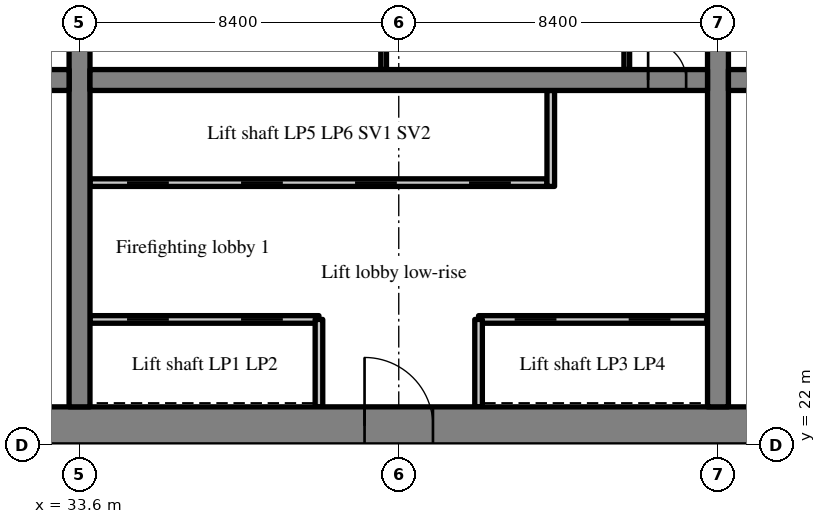
"""IFC4 building model, lengths in metres.
Left out: names, types, materials, properties, quantities, classifications, styles, units other than length and angle.
Written with IfcOpenShell. Run it as: python <this file> out.ifc"""

import sys

from ifc_helpers import new_model, si_unit, direction, frame, frame_2d, origin, place, context, subcontext, project, spatial, rectangle, extrude, source, transform, mapped, element, fill, save


model = new_model("IFC4")
c1 = context("Model", 3, precision=1e-05, world=origin(), true_north=direction((0.0, 1.0)))
c2 = subcontext(c1, "Body", "Model", "MODEL_VIEW")
j1 = project(units=[si_unit("LENGTHUNIT", "METRE"), si_unit("PLANEANGLEUNIT", "RADIAN")], contexts=[c1])
p1 = place(None, origin())
s1 = spatial("IfcSite", under=j1, at=p1, CompositionType="ELEMENT")
p2 = place(p1, origin())
s2 = spatial("IfcBuilding", under=s1, at=p2, CompositionType="ELEMENT")
p3 = place(p2, frame((0.0, 0.0, 73.4)))
s3 = spatial("IfcBuildingStorey", under=s2, at=p3, CompositionType="ELEMENT", Elevation=73.4)
m1 = source(origin(), c2, "Body", "SweptSolid", [
    extrude(rectangle(XDim=50.4, YDim=1.0, at=frame_2d((25.2, 0.0))), origin(), (0.0, 0.0, 1.0), 3.52),
])
p4 = place(p3, frame((25.2, 22.5, 0.0), z_axis=(0.0, 0.0, 1.0), x_axis=(1.0, 0.0, 0.0)))
e1 = element("IfcWall", 1, at=p4, inside=s3, PredefinedType="SHEAR", context=c2, shape_type="MappedRepresentation", body=[
    mapped(m1, transform((0.0, 0.0, 0.0), scale=1.0)),
])
m2 = source(origin(), c2, "Body", "SweptSolid", [
    extrude(rectangle(XDim=1.8, YDim=2.1, at=frame_2d((0.9, 1.05))), frame((0.0, 0.51, 0.0), z_axis=(0.0, -1.0, 0.0), x_axis=(1.0, 0.0, 0.0)), (0.0, 0.0, 1.0), 1.02),
])
p5 = place(p4, frame((15.9, 0.0, 0.0)))
e2 = element("IfcOpeningElement", 2, at=p5, cuts=e1, PredefinedType="OPENING", context=c2, shape_type="MappedRepresentation", body=[
    mapped(m2, transform((0.0, 0.0, 0.0), scale=1.0)),
])
m3 = source(origin(), c2, "Body", "SweptSolid", [
    extrude(rectangle(XDim=1.2, YDim=2.1, at=frame_2d((0.6, 1.05))), frame((0.0, 0.51, 0.0), z_axis=(0.0, -1.0, 0.0), x_axis=(1.0, 0.0, 0.0)), (0.0, 0.0, 1.0), 1.02),
])
p6 = place(p4, frame((26.987, 0.0, 0.0)))
e3 = element("IfcOpeningElement", 3, at=p6, cuts=e1, PredefinedType="OPENING", context=c2, shape_type="MappedRepresentation", body=[
    mapped(m3, transform((0.0, 0.0, 0.0), scale=1.0)),
])
m4 = source(origin(), c2, "Body", "SweptSolid", [
    extrude(rectangle(XDim=0.9, YDim=2.1, at=frame_2d((0.45, 1.05))), frame((0.0, 0.51, 0.0), z_axis=(0.0, -1.0, 0.0), x_axis=(1.0, 0.0, 0.0)), (0.0, 0.0, 1.0), 1.02),
])
p7 = place(p4, frame((32.25, 0.0, 0.0)))
e4 = element("IfcOpeningElement", 4, at=p7, cuts=e1, PredefinedType="OPENING", context=c2, shape_type="MappedRepresentation", body=[
    mapped(m4, transform((0.0, 0.0, 0.0), scale=1.0)),
])
p8 = place(p4, frame((38.262, 0.0, 0.0)))
e5 = element("IfcOpeningElement", 5, at=p8, cuts=e1, PredefinedType="OPENING", context=c2, shape_type="MappedRepresentation", body=[
    mapped(m4, transform((0.0, 0.0, 0.0), scale=1.0)),
])
p9 = place(p4, frame((6.438, 0.0, 0.0)))
e6 = element("IfcOpeningElement", 6, at=p9, cuts=e1, PredefinedType="OPENING", context=c2, shape_type="MappedRepresentation", body=[
    mapped(m3, transform((0.0, 0.0, 0.0), scale=1.0)),
])
p10 = place(p4, frame((47.725, 0.0, 0.0)))
e7 = element("IfcOpeningElement", 7, at=p10, cuts=e1, PredefinedType="OPENING", context=c2, shape_type="MappedRepresentation", body=[
    mapped(m3, transform((0.0, 0.0, 0.0), scale=1.0)),
])
m5 = source(origin(), c2, "Body", "SweptSolid", [
    extrude(rectangle(XDim=18.0, YDim=0.55, at=frame_2d((9.0, 0.0))), origin(), (0.0, 0.0, 1.0), 3.52),
])
p11 = place(p3, frame((33.6, 23.0, 0.0), z_axis=(0.0, 0.0, 1.0), x_axis=(0.0, 1.0, 0.0)))
e8 = element("IfcWall", 8, at=p11, inside=s3, PredefinedType="SHEAR", context=c2, shape_type="MappedRepresentation", body=[
    mapped(m5, transform((0.0, 0.0, 0.0), scale=1.0)),
])
m6 = source(origin(), c2, "Body", "SweptSolid", [
    extrude(rectangle(XDim=1.1, YDim=2.1, at=frame_2d((0.55, 1.05))), frame((0.0, 0.285, 0.0), z_axis=(0.0, -1.0, 0.0), x_axis=(1.0, 0.0, 0.0)), (0.0, 0.0, 1.0), 0.57),
])
p12 = place(p11, frame((12.45, 0.0, 0.0)))
e9 = element("IfcOpeningElement", 9, at=p12, cuts=e8, PredefinedType="OPENING", context=c2, shape_type="MappedRepresentation", body=[
    mapped(m6, transform((0.0, 0.0, 0.0), scale=1.0)),
])
p13 = place(p3, frame((50.4, 23.0, 0.0), z_axis=(0.0, 0.0, 1.0), x_axis=(0.0, 1.0, 0.0)))
e10 = element("IfcWall", 10, at=p13, inside=s3, PredefinedType="SHEAR", context=c2, shape_type="MappedRepresentation", body=[
    mapped(m5, transform((0.0, 0.0, 0.0), scale=1.0)),
])
p14 = place(p13, frame((12.45, 0.0, 0.0)))
e11 = element("IfcOpeningElement", 11, at=p14, cuts=e10, PredefinedType="OPENING", context=c2, shape_type="MappedRepresentation", body=[
    mapped(m6, transform((0.0, 0.0, 0.0), scale=1.0)),
])
m7 = source(origin(), c2, "Body", "SweptSolid", [
    extrude(rectangle(XDim=7.125, YDim=0.55, at=frame_2d((3.562, 0.0))), origin(), (0.0, 0.0, 1.0), 3.52),
])
p15 = place(p3, frame((26.2, 31.6, 0.0), z_axis=(0.0, 0.0, 1.0), x_axis=(1.0, 0.0, 0.0)))
e12 = element("IfcWall", 12, at=p15, inside=s3, PredefinedType="SHEAR", context=c2, shape_type="MappedRepresentation", body=[
    mapped(m7, transform((0.0, 0.0, 0.0), scale=1.0)),
])
p16 = place(p15, frame((5.488, 0.0, 0.0)))
e13 = element("IfcOpeningElement", 13, at=p16, cuts=e12, PredefinedType="OPENING", context=c2, shape_type="MappedRepresentation", body=[
    mapped(m6, transform((0.0, 0.0, 0.0), scale=1.0)),
])
m8 = source(origin(), c2, "Body", "SweptSolid", [
    extrude(rectangle(XDim=16.25, YDim=0.55, at=frame_2d((8.125, 0.0))), origin(), (0.0, 0.0, 1.0), 3.52),
])
p17 = place(p3, frame((33.875, 31.6, 0.0), z_axis=(0.0, 0.0, 1.0), x_axis=(1.0, 0.0, 0.0)))
e14 = element("IfcWall", 14, at=p17, inside=s3, PredefinedType="SHEAR", context=c2, shape_type="MappedRepresentation", body=[
    mapped(m8, transform((0.0, 0.0, 0.0), scale=1.0)),
])
m9 = source(origin(), c2, "Body", "SweptSolid", [
    extrude(rectangle(XDim=1.0, YDim=2.1, at=frame_2d((0.5, 1.05))), frame((0.0, 0.285, 0.0), z_axis=(0.0, -1.0, 0.0), x_axis=(1.0, 0.0, 0.0)), (0.0, 0.0, 1.0), 0.57),
])
p18 = place(p17, frame((14.687, 0.0, 0.0)))
e15 = element("IfcOpeningElement", 15, at=p18, cuts=e14, PredefinedType="OPENING", context=c2, shape_type="MappedRepresentation", body=[
    mapped(m9, transform((0.0, 0.0, 0.0), scale=1.0)),
])
p19 = place(p3, frame((50.675, 31.6, 0.0), z_axis=(0.0, 0.0, 1.0), x_axis=(1.0, 0.0, 0.0)))
e16 = element("IfcWall", 16, at=p19, inside=s3, PredefinedType="SHEAR", context=c2, shape_type="MappedRepresentation", body=[
    mapped(m8, transform((0.0, 0.0, 0.0), scale=1.0)),
])
p20 = place(p19, frame((0.562, 0.0, 0.0)))
e17 = element("IfcOpeningElement", 17, at=p20, cuts=e16, PredefinedType="OPENING", context=c2, shape_type="MappedRepresentation", body=[
    mapped(m9, transform((0.0, 0.0, 0.0), scale=1.0)),
])
m10 = source(origin(), c2, "Body", "SweptSolid", [
    extrude(rectangle(XDim=6.025, YDim=0.2, at=frame_2d((3.012, 0.0))), origin(), (0.0, 0.0, 1.0), 3.52),
])
p21 = place(p3, frame((33.875, 25.3, 0.0), z_axis=(0.0, 0.0, 1.0), x_axis=(1.0, 0.0, 0.0)))
e18 = element("IfcWall", 18, at=p21, inside=s3, PredefinedType="SOLIDWALL", context=c2, shape_type="MappedRepresentation", body=[
    mapped(m10, transform((0.0, 0.0, 0.0), scale=1.0)),
])
m11 = source(origin(), c2, "Body", "SweptSolid", [
    extrude(rectangle(XDim=1.1, YDim=2.1, at=frame_2d((0.55, 1.05))), frame((0.0, 0.11, 0.0), z_axis=(0.0, -1.0, 0.0), x_axis=(1.0, 0.0, 0.0)), (0.0, 0.0, 1.0), 0.22),
])
p22 = place(p21, frame((0.975, 0.0, 0.0)))
e19 = element("IfcOpeningElement", 19, at=p22, cuts=e18, PredefinedType="OPENING", context=c2, shape_type="MappedRepresentation", body=[
    mapped(m11, transform((0.0, 0.0, 0.0), scale=1.0)),
])
p23 = place(p21, frame((3.975, 0.0, 0.0)))
e20 = element("IfcOpeningElement", 20, at=p23, cuts=e18, PredefinedType="OPENING", context=c2, shape_type="MappedRepresentation", body=[
    mapped(m11, transform((0.0, 0.0, 0.0), scale=1.0)),
])
m12 = source(origin(), c2, "Body", "SweptSolid", [
    extrude(rectangle(XDim=6.0, YDim=0.2, at=frame_2d((3.0, 0.0))), origin(), (0.0, 0.0, 1.0), 3.52),
])
p24 = place(p3, frame((44.1, 25.3, 0.0), z_axis=(0.0, 0.0, 1.0), x_axis=(1.0, 0.0, 0.0)))
e21 = element("IfcWall", 21, at=p24, inside=s3, PredefinedType="SOLIDWALL", context=c2, shape_type="MappedRepresentation", body=[
    mapped(m12, transform((0.0, 0.0, 0.0), scale=1.0)),
])
p25 = place(p24, frame((0.95, 0.0, 0.0)))
e22 = element("IfcOpeningElement", 22, at=p25, cuts=e21, PredefinedType="OPENING", context=c2, shape_type="MappedRepresentation", body=[
    mapped(m11, transform((0.0, 0.0, 0.0), scale=1.0)),
])
p26 = place(p24, frame((3.95, 0.0, 0.0)))
e23 = element("IfcOpeningElement", 23, at=p26, cuts=e21, PredefinedType="OPENING", context=c2, shape_type="MappedRepresentation", body=[
    mapped(m11, transform((0.0, 0.0, 0.0), scale=1.0)),
])
m13 = source(origin(), c2, "Body", "SweptSolid", [
    extrude(rectangle(XDim=12.025, YDim=0.2, at=frame_2d((6.012, 0.0))), origin(), (0.0, 0.0, 1.0), 3.52),
])
p27 = place(p3, frame((33.875, 28.9, 0.0), z_axis=(0.0, 0.0, 1.0), x_axis=(1.0, 0.0, 0.0)))
e24 = element("IfcWall", 24, at=p27, inside=s3, PredefinedType="SOLIDWALL", context=c2, shape_type="MappedRepresentation", body=[
    mapped(m13, transform((0.0, 0.0, 0.0), scale=1.0)),
])
p28 = place(p27, frame((0.975, 0.0, 0.0)))
e25 = element("IfcOpeningElement", 25, at=p28, cuts=e24, PredefinedType="OPENING", context=c2, shape_type="MappedRepresentation", body=[
    mapped(m11, transform((0.0, 0.0, 0.0), scale=1.0)),
])
p29 = place(p27, frame((3.975, 0.0, 0.0)))
e26 = element("IfcOpeningElement", 26, at=p29, cuts=e24, PredefinedType="OPENING", context=c2, shape_type="MappedRepresentation", body=[
    mapped(m11, transform((0.0, 0.0, 0.0), scale=1.0)),
])
p30 = place(p27, frame((6.975, 0.0, 0.0)))
e27 = element("IfcOpeningElement", 27, at=p30, cuts=e24, PredefinedType="OPENING", context=c2, shape_type="MappedRepresentation", body=[
    mapped(m11, transform((0.0, 0.0, 0.0), scale=1.0)),
])
p31 = place(p27, frame((9.975, 0.0, 0.0)))
e28 = element("IfcOpeningElement", 28, at=p31, cuts=e24, PredefinedType="OPENING", context=c2, shape_type="MappedRepresentation", body=[
    mapped(m11, transform((0.0, 0.0, 0.0), scale=1.0)),
])
m14 = source(origin(), c2, "Body", "SweptSolid", [
    extrude(rectangle(XDim=2.3, YDim=0.2, at=frame_2d((1.15, 0.0))), origin(), (0.0, 0.0, 1.0), 3.52),
])
for number, where, z_axis, x_axis in (
    (29, (39.9, 23.0, 0.0), (0.0, 0.0, 1.0), (0.0, 1.0, 0.0)),
    (30, (44.1, 23.0, 0.0), (0.0, 0.0, 1.0), (0.0, 1.0, 0.0)),
):
    element("IfcWall", number, at=place(p3, frame(where, z_axis=z_axis, x_axis=x_axis)), inside=s3, PredefinedType="SOLIDWALL", context=c2, shape_type="MappedRepresentation", body=[
        mapped(m14, transform((0.0, 0.0, 0.0), scale=1.0)),
    ])
m15 = source(origin(), c2, "Body", "SweptSolid", [
    extrude(rectangle(XDim=2.525, YDim=0.2, at=frame_2d((1.262, 0.0))), origin(), (0.0, 0.0, 1.0), 3.52),
])
p32 = place(p3, frame((46.0, 28.8, 0.0), z_axis=(0.0, 0.0, 1.0), x_axis=(0.0, 1.0, 0.0)))
e31 = element("IfcWall", 31, at=p32, inside=s3, PredefinedType="SOLIDWALL", context=c2, shape_type="MappedRepresentation", body=[
    mapped(m15, transform((0.0, 0.0, 0.0), scale=1.0)),
])
m16 = source(origin(), c2, "Body", "SweptSolid", [
    extrude(rectangle(XDim=3.125, YDim=0.15, at=frame_2d((1.562, 0.0))), origin(), (0.0, 0.0, 1.0), 3.52),
])
for number, where, z_axis, x_axis in (
    (32, (48.0, 31.875, 0.0), (0.0, 0.0, 1.0), (0.0, 1.0, 0.0)),
    (33, (41.602, 31.875, 0.0), (0.0, 0.0, 1.0), (0.0, 1.0, 0.0)),
):
    element("IfcWall", number, at=place(p3, frame(where, z_axis=z_axis, x_axis=x_axis)), inside=s3, PredefinedType="PARTITIONING", context=c2, shape_type="MappedRepresentation", body=[
        mapped(m16, transform((0.0, 0.0, 0.0), scale=1.0)),
    ])
m17 = source(origin(), c2, "Body", "SweptSolid", [
    extrude(rectangle(XDim=1.8, YDim=2.1, at=frame_2d((0.9, 1.05))), frame((0.0, 0.375, 0.0), z_axis=(0.0, -1.0, 0.0), x_axis=(1.0, 0.0, 0.0)), (0.0, 0.0, 1.0), 0.05),
])
p33 = place(p5, origin())
e34 = element("IfcDoor", 34, at=p33, inside=s3, OperationType="DOUBLE_DOOR_SINGLE_SWING", PredefinedType="DOOR", context=c2, shape_type="MappedRepresentation", body=[
    mapped(m17, transform((0.0, 0.0, 0.0), scale=1.0)),
])
fill(e2, e34)
m18 = source(origin(), c2, "Body", "SweptSolid", [
    extrude(rectangle(XDim=1.0, YDim=2.1, at=frame_2d((0.5, 1.05))), frame((0.0, 0.025, 0.0), z_axis=(0.0, -1.0, 0.0), x_axis=(1.0, 0.0, 0.0)), (0.0, 0.0, 1.0), 0.05),
])
p34 = place(p18, origin())
e35 = element("IfcDoor", 35, at=p34, inside=s3, OperationType="SINGLE_SWING_LEFT", PredefinedType="DOOR", context=c2, shape_type="MappedRepresentation", body=[
    mapped(m18, transform((0.0, 0.0, 0.0), scale=1.0)),
])
fill(e15, e35)
m19 = source(origin(), c2, "Body", "SweptSolid", [
    extrude(rectangle(XDim=1.1, YDim=2.1, at=frame_2d((0.55, 1.05))), frame((0.0, 0.025, 0.0), z_axis=(0.0, -1.0, 0.0), x_axis=(1.0, 0.0, 0.0)), (0.0, 0.0, 1.0), 0.05),
])
p35 = place(p22, origin())
e36 = element("IfcDoor", 36, at=p35, inside=s3, OperationType="SLIDING_TO_LEFT", PredefinedType="DOOR", context=c2, shape_type="MappedRepresentation", body=[
    mapped(m19, transform((0.0, 0.0, 0.0), scale=1.0)),
])
fill(e19, e36)
p36 = place(p23, origin())
e37 = element("IfcDoor", 37, at=p36, inside=s3, OperationType="SLIDING_TO_RIGHT", PredefinedType="DOOR", context=c2, shape_type="MappedRepresentation", body=[
    mapped(m19, transform((0.0, 0.0, 0.0), scale=1.0)),
])
fill(e20, e37)
p37 = place(p25, origin())
e38 = element("IfcDoor", 38, at=p37, inside=s3, OperationType="SLIDING_TO_LEFT", PredefinedType="DOOR", context=c2, shape_type="MappedRepresentation", body=[
    mapped(m19, transform((0.0, 0.0, 0.0), scale=1.0)),
])
fill(e22, e38)
p38 = place(p26, origin())
e39 = element("IfcDoor", 39, at=p38, inside=s3, OperationType="SLIDING_TO_RIGHT", PredefinedType="DOOR", context=c2, shape_type="MappedRepresentation", body=[
    mapped(m19, transform((0.0, 0.0, 0.0), scale=1.0)),
])
fill(e23, e39)
p39 = place(p28, origin())
e40 = element("IfcDoor", 40, at=p39, inside=s3, OperationType="SLIDING_TO_LEFT", PredefinedType="DOOR", context=c2, shape_type="MappedRepresentation", body=[
    mapped(m19, transform((0.0, 0.0, 0.0), scale=1.0)),
])
fill(e25, e40)
p40 = place(p29, origin())
e41 = element("IfcDoor", 41, at=p40, inside=s3, OperationType="SLIDING_TO_RIGHT", PredefinedType="DOOR", context=c2, shape_type="MappedRepresentation", body=[
    mapped(m19, transform((0.0, 0.0, 0.0), scale=1.0)),
])
fill(e26, e41)
p41 = place(p30, origin())
e42 = element("IfcDoor", 42, at=p41, inside=s3, OperationType="SLIDING_TO_LEFT", PredefinedType="DOOR", context=c2, shape_type="MappedRepresentation", body=[
    mapped(m19, transform((0.0, 0.0, 0.0), scale=1.0)),
])
fill(e27, e42)
p42 = place(p31, origin())
e43 = element("IfcDoor", 43, at=p42, inside=s3, OperationType="SLIDING_TO_RIGHT", PredefinedType="DOOR", context=c2, shape_type="MappedRepresentation", body=[
    mapped(m19, transform((0.0, 0.0, 0.0), scale=1.0)),
])
fill(e28, e43)
save(model, sys.argv[1])
